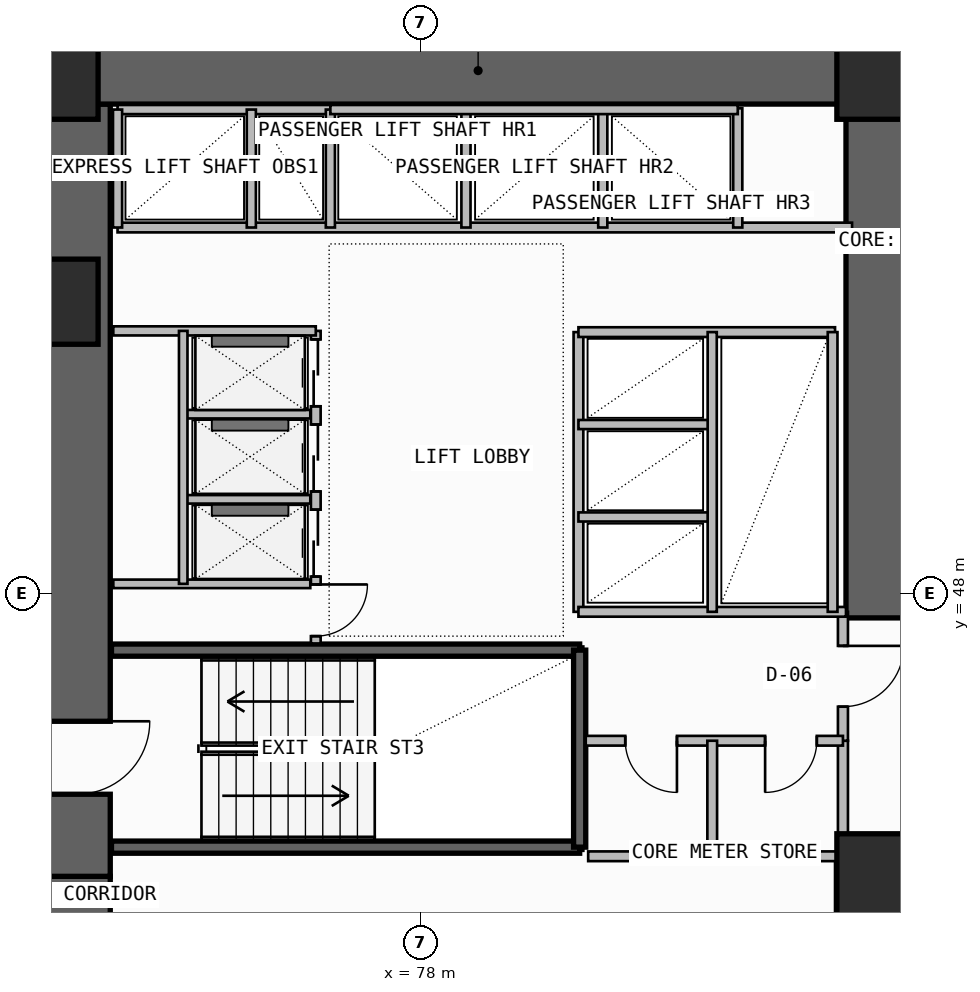
"""IFC4 building model, lengths in metres.
Left out: names, types, materials, properties, quantities, classifications, styles, units other than length and angle.
Written with IfcOpenShell. Run it as: python <this file> out.ifc"""

import sys

from ifc_helpers import new_model, si_unit, direction, frame, frame_2d, origin, origin_2d, place, context, subcontext, project, spatial, rectangle, extrude, element, fill, save


model = new_model("IFC4")
c1 = context("Model", 3, precision=1e-05, world=origin(), true_north=direction((0.0, 1.0)))
c2 = subcontext(c1, "Body", "Model", "MODEL_VIEW")
j1 = project(units=[si_unit("LENGTHUNIT", "METRE"), si_unit("PLANEANGLEUNIT", "RADIAN")], contexts=[c1])
p1 = place(None, origin())
s1 = spatial("IfcSite", under=j1, at=p1, CompositionType="ELEMENT")
p2 = place(p1, origin())
s2 = spatial("IfcBuilding", under=s1, at=p2, CompositionType="ELEMENT")
p3 = place(p2, frame((0.0, 0.0, 55.5)))
s3 = spatial("IfcBuildingStorey", under=s2, at=p3, CompositionType="ELEMENT", Elevation=55.5)
p4 = place(p3, frame((72.35, 35.5, -0.2), z_axis=(0.0, 0.0, 1.0), x_axis=(0.0, 1.0, 0.0)))
e1 = element("IfcWall", 1, at=p4, inside=s3, PredefinedType="SHEAR", context=c2, shape_type="SweptSolid", body=[
    extrude(rectangle(XDim=7.85, YDim=1.1, at=frame_2d((3.925, 0.0))), origin(), (0.0, 0.0, 1.0), 3.3),
])
p5 = place(p4, frame((1.45, 0.0, 0.2)))
e2 = element("IfcOpeningElement", 2, at=p5, cuts=e1, PredefinedType="OPENING", context=c2, shape_type="SweptSolid", body=[
    extrude(rectangle(XDim=1.2, YDim=2.2, at=frame_2d((0.6, 1.1))), frame((0.0, 0.56, 0.0), z_axis=(0.0, -1.0, 0.0), x_axis=(1.0, 0.0, 0.0)), (0.0, 0.0, 1.0), 1.12),
])
p6 = place(p3, frame((72.35, 43.35, -0.2), z_axis=(0.0, 0.0, 1.0), x_axis=(0.0, 1.0, 0.0)))
e3 = element("IfcWall", 3, at=p6, inside=s3, PredefinedType="SHEAR", context=c2, shape_type="SweptSolid", body=[
    extrude(rectangle(XDim=12.7, YDim=1.1, at=frame_2d((6.35, 0.0))), origin(), (0.0, 0.0, 1.0), 3.3),
])
p7 = place(p6, frame((1.35, 0.0, 0.2)))
e4 = element("IfcOpeningElement", 4, at=p7, cuts=e3, PredefinedType="OPENING", context=c2, shape_type="SweptSolid", body=[
    extrude(rectangle(XDim=1.2, YDim=2.2, at=frame_2d((0.6, 1.1))), frame((0.0, 0.56, 0.0), z_axis=(0.0, -1.0, 0.0), x_axis=(1.0, 0.0, 0.0)), (0.0, 0.0, 1.0), 1.12),
])
p8 = place(p3, frame((71.8, 56.6, -0.2), z_axis=(0.0, 0.0, 1.0), x_axis=(1.0, 0.0, 0.0)))
e5 = element("IfcWall", 5, at=p8, inside=s3, PredefinedType="SHEAR", context=c2, shape_type="SweptSolid", body=[
    extrude(rectangle(XDim=14.3, YDim=1.1, at=frame_2d((7.15, 0.0))), origin(), (0.0, 0.0, 1.0), 3.3),
])
p9 = place(p3, frame((85.55, 47.6, -0.2), z_axis=(0.0, 0.0, 1.0), x_axis=(0.0, 1.0, 0.0)))
e6 = element("IfcWall", 6, at=p9, inside=s3, PredefinedType="SHEAR", context=c2, shape_type="SweptSolid", body=[
    extrude(rectangle(XDim=8.45, YDim=1.1, at=frame_2d((4.225, 0.0))), origin(), (0.0, 0.0, 1.0), 3.3),
])
for number, where, z_axis, x_axis in (
    (7, (85.55, 43.35, 0.0), (0.0, 0.0, 1.0), (1.0, 0.0, 0.0)),
    (8, (72.0, 52.8, 0.0), (0.0, 0.0, 1.0), (1.0, 0.0, 0.0)),
    (9, (72.0, 56.5, 0.0), (0.0, 0.0, 1.0), (1.0, 0.0, 0.0)),
    (10, (85.55, 56.5, 0.0), (0.0, 0.0, 1.0), (1.0, 0.0, 0.0)),
):
    element("IfcColumn", number, at=place(p3, frame(where, z_axis=z_axis, x_axis=x_axis)), inside=s3, PredefinedType="COLUMN", context=c2, shape_type="SweptSolid", body=[
        extrude(rectangle(XDim=1.4, YDim=1.4, at=origin_2d()), origin(), (0.0, 0.0, 1.0), 3.6),
    ])
p10 = place(p3, frame((84.92, 38.85, 0.0), z_axis=(0.0, 0.0, 1.0), x_axis=(0.0, 1.0, 0.0)))
e11 = element("IfcWall", 11, at=p10, inside=s3, PredefinedType="SOLIDWALL", context=c2, shape_type="SweptSolid", body=[
    extrude(rectangle(XDim=4.83, YDim=0.2, at=frame_2d((2.415, 0.0))), origin(), (0.0, 0.0, 1.0), 3.1),
])
p11 = place(p10, frame((1.25, 0.0, 0.0)))
e12 = element("IfcOpeningElement", 12, at=p11, cuts=e11, PredefinedType="OPENING", context=c2, shape_type="SweptSolid", body=[
    extrude(rectangle(XDim=1.1, YDim=2.2, at=frame_2d((0.55, 1.1))), frame((0.0, 0.11, 0.0), z_axis=(0.0, -1.0, 0.0), x_axis=(1.0, 0.0, 0.0)), (0.0, 0.0, 1.0), 0.22),
])
for number, where, z_axis, x_axis in (
    (13, (72.92, 43.83, -0.2), (0.0, 0.0, 1.0), (1.0, 0.0, 0.0)),
    (14, (72.92, 47.07, -0.2), (0.0, 0.0, 1.0), (1.0, 0.0, 0.0)),
):
    element("IfcWall", number, at=place(p3, frame(where, z_axis=z_axis, x_axis=x_axis)), inside=s3, PredefinedType="SOLIDWALL", context=c2, shape_type="SweptSolid", body=[
        extrude(rectangle(XDim=7.7, YDim=0.2, at=frame_2d((3.85, 0.0))), origin(), (0.0, 0.0, 1.0), 3.3),
    ])
p12 = place(p3, frame((80.62, 43.83, -0.2), z_axis=(0.0, 0.0, 1.0), x_axis=(0.0, 1.0, 0.0)))
e15 = element("IfcWall", 15, at=p12, inside=s3, PredefinedType="SOLIDWALL", context=c2, shape_type="SweptSolid", body=[
    extrude(rectangle(XDim=3.24, YDim=0.2, at=frame_2d((1.62, 0.0))), origin(), (0.0, 0.0, 1.0), 3.3),
])
p13 = place(p3, frame((84.95, 43.68, 0.0), z_axis=(0.0, 0.0, 1.0), x_axis=(0.0, 1.0, 0.0)))
e16 = element("IfcWall", 16, at=p13, inside=s3, PredefinedType="PLUMBINGWALL", context=c2, shape_type="SweptSolid", body=[
    extrude(rectangle(XDim=1.9, YDim=0.165, at=frame_2d((0.95, 0.0))), origin(), (0.0, 0.0, 1.0), 3.1),
])
p14 = place(p3, frame((84.95, 45.58, 0.0), z_axis=(0.0, 0.0, 1.0), x_axis=(0.0, 1.0, 0.0)))
e17 = element("IfcWall", 17, at=p14, inside=s3, PredefinedType="PARTITIONING", context=c2, shape_type="SweptSolid", body=[
    extrude(rectangle(XDim=2.12, YDim=0.165, at=frame_2d((1.06, 0.0))), origin(), (0.0, 0.0, 1.0), 3.1),
])
p15 = place(p14, frame((0.56, 0.0, 0.0)))
e18 = element("IfcOpeningElement", 18, at=p15, cuts=e17, PredefinedType="OPENING", context=c2, shape_type="SweptSolid", body=[
    extrude(rectangle(XDim=1.0, YDim=2.2, at=frame_2d((0.5, 1.1))), frame((0.0, 0.093, 0.0), z_axis=(0.0, -1.0, 0.0), x_axis=(1.0, 0.0, 0.0)), (0.0, 0.0, 1.0), 0.185),
])
p16 = place(p3, frame((80.72, 45.58, 0.0), z_axis=(0.0, 0.0, 1.0), x_axis=(1.0, 0.0, 0.0)))
e19 = element("IfcWall", 19, at=p16, inside=s3, PredefinedType="PLUMBINGWALL", context=c2, shape_type="SweptSolid", body=[
    extrude(rectangle(XDim=4.23, YDim=0.16, at=frame_2d((2.115, 0.0))), origin(), (0.0, 0.0, 1.0), 3.1),
])
p17 = place(p16, frame((0.65, 0.0, 0.0)))
e20 = element("IfcOpeningElement", 20, at=p17, cuts=e19, PredefinedType="OPENING", context=c2, shape_type="SweptSolid", body=[
    extrude(rectangle(XDim=0.85, YDim=2.05, at=frame_2d((0.425, 1.025))), frame((0.0, 0.09, 0.0), z_axis=(0.0, -1.0, 0.0), x_axis=(1.0, 0.0, 0.0)), (0.0, 0.0, 1.0), 0.18),
])
p18 = place(p16, frame((2.95, 0.0, 0.0)))
e21 = element("IfcOpeningElement", 21, at=p18, cuts=e19, PredefinedType="OPENING", context=c2, shape_type="SweptSolid", body=[
    extrude(rectangle(XDim=0.85, YDim=2.05, at=frame_2d((0.425, 1.025))), frame((0.0, 0.09, 0.0), z_axis=(0.0, -1.0, 0.0), x_axis=(1.0, 0.0, 0.0)), (0.0, 0.0, 1.0), 0.18),
])
p19 = place(p3, frame((80.76, 43.68, 0.0), z_axis=(0.0, 0.0, 1.0), x_axis=(1.0, 0.0, 0.0)))
e22 = element("IfcWall", 22, at=p19, inside=s3, PredefinedType="PLUMBINGWALL", context=c2, shape_type="SweptSolid", body=[
    extrude(rectangle(XDim=4.19, YDim=0.16, at=frame_2d((2.095, 0.0))), origin(), (0.0, 0.0, 1.0), 3.1),
])
p20 = place(p3, frame((82.8, 43.68, 0.0), z_axis=(0.0, 0.0, 1.0), x_axis=(0.0, 1.0, 0.0)))
e23 = element("IfcWall", 23, at=p20, inside=s3, PredefinedType="PLUMBINGWALL", context=c2, shape_type="SweptSolid", body=[
    extrude(rectangle(XDim=1.9, YDim=0.16, at=frame_2d((0.95, 0.0))), origin(), (0.0, 0.0, 1.0), 3.1),
])
p21 = place(p3, frame((76.28, 47.18, 0.0), z_axis=(0.0, 0.0, 1.0), x_axis=(0.0, 1.0, 0.0)))
e24 = element("IfcWall", 24, at=p21, inside=s3, PredefinedType="SOLIDWALL", context=c2, shape_type="SweptSolid", body=[
    extrude(rectangle(XDim=5.14, YDim=0.16, at=frame_2d((2.57, 0.0))), origin(), (0.0, 0.0, 1.0), 3.1),
])
p22 = place(p21, frame((1.1, 0.0, 0.0)))
e25 = element("IfcOpeningElement", 25, at=p22, cuts=e24, PredefinedType="OPENING", context=c2, shape_type="SweptSolid", body=[
    extrude(rectangle(XDim=1.1, YDim=2.25, at=frame_2d((0.55, 1.125))), frame((0.0, 0.09, 0.0), z_axis=(0.0, -1.0, 0.0), x_axis=(1.0, 0.0, 0.0)), (0.0, 0.0, 1.0), 0.18),
])
p23 = place(p21, frame((2.5, 0.0, 0.0)))
e26 = element("IfcOpeningElement", 26, at=p23, cuts=e24, PredefinedType="OPENING", context=c2, shape_type="SweptSolid", body=[
    extrude(rectangle(XDim=1.1, YDim=2.25, at=frame_2d((0.55, 1.125))), frame((0.0, 0.09, 0.0), z_axis=(0.0, -1.0, 0.0), x_axis=(1.0, 0.0, 0.0)), (0.0, 0.0, 1.0), 0.18),
])
p24 = place(p21, frame((3.9, 0.0, 0.0)))
e27 = element("IfcOpeningElement", 27, at=p24, cuts=e24, PredefinedType="OPENING", context=c2, shape_type="SweptSolid", body=[
    extrude(rectangle(XDim=1.1, YDim=2.25, at=frame_2d((0.55, 1.125))), frame((0.0, 0.09, 0.0), z_axis=(0.0, -1.0, 0.0), x_axis=(1.0, 0.0, 0.0)), (0.0, 0.0, 1.0), 0.18),
])
p25 = place(p21, frame((0.12, 0.0, 0.0)))
e28 = element("IfcOpeningElement", 28, at=p25, cuts=e24, PredefinedType="OPENING", context=c2, shape_type="SweptSolid", body=[
    extrude(rectangle(XDim=0.85, YDim=2.05, at=frame_2d((0.425, 1.025))), frame((0.0, 0.09, 0.0), z_axis=(0.0, -1.0, 0.0), x_axis=(1.0, 0.0, 0.0)), (0.0, 0.0, 1.0), 0.18),
])
p26 = place(p3, frame((72.95, 52.32, 0.0), z_axis=(0.0, 0.0, 1.0), x_axis=(1.0, 0.0, 0.0)))
e29 = element("IfcWall", 29, at=p26, inside=s3, PredefinedType="SOLIDWALL", context=c2, shape_type="SweptSolid", body=[
    extrude(rectangle(XDim=3.33, YDim=0.15, at=frame_2d((1.665, 0.0))), origin(), (0.0, 0.0, 1.0), 3.1),
])
p27 = place(p3, frame((72.95, 48.16, 0.0), z_axis=(0.0, 0.0, 1.0), x_axis=(1.0, 0.0, 0.0)))
e30 = element("IfcWall", 30, at=p27, inside=s3, PredefinedType="PLUMBINGWALL", context=c2, shape_type="SweptSolid", body=[
    extrude(rectangle(XDim=3.24, YDim=0.14, at=frame_2d((1.62, 0.0))), origin(), (0.0, 0.0, 1.0), 3.1),
])
for number, where, z_axis, x_axis in (
    (31, (74.15, 49.55, 0.0), (0.0, 0.0, 1.0), (1.0, 0.0, 0.0)),
    (32, (74.15, 50.95, 0.0), (0.0, 0.0, 1.0), (1.0, 0.0, 0.0)),
):
    element("IfcWall", number, at=place(p3, frame(where, z_axis=z_axis, x_axis=x_axis)), inside=s3, PredefinedType="PLUMBINGWALL", context=c2, shape_type="SweptSolid", body=[
        extrude(rectangle(XDim=2.04, YDim=0.14, at=frame_2d((1.02, 0.0))), origin(), (0.0, 0.0, 1.0), 3.1),
    ])
p28 = place(p3, frame((74.1, 48.16, 0.0), z_axis=(0.0, 0.0, 1.0), x_axis=(0.0, 1.0, 0.0)))
e33 = element("IfcWall", 33, at=p28, inside=s3, PredefinedType="PLUMBINGWALL", context=c2, shape_type="SweptSolid", body=[
    extrude(rectangle(XDim=4.16, YDim=0.14, at=frame_2d((2.08, 0.0))), origin(), (0.0, 0.0, 1.0), 3.1),
])
p29 = place(p3, frame((80.6, 47.7, 0.0), z_axis=(0.0, 0.0, 1.0), x_axis=(0.0, 1.0, 0.0)))
e34 = element("IfcWall", 34, at=p29, inside=s3, PredefinedType="SOLIDWALL", context=c2, shape_type="SweptSolid", body=[
    extrude(rectangle(XDim=4.6, YDim=0.16, at=frame_2d((2.3, 0.0))), origin(), (0.0, 0.0, 1.0), 3.1),
])
p30 = place(p3, frame((80.6, 47.7, 0.0), z_axis=(0.0, 0.0, 1.0), x_axis=(1.0, 0.0, 0.0)))
e35 = element("IfcWall", 35, at=p30, inside=s3, PredefinedType="SOLIDWALL", context=c2, shape_type="SweptSolid", body=[
    extrude(rectangle(XDim=4.4, YDim=0.16, at=frame_2d((2.2, 0.0))), origin(), (0.0, 0.0, 1.0), 3.1),
])
p31 = place(p3, frame((80.6, 52.3, 0.0), z_axis=(0.0, 0.0, 1.0), x_axis=(1.0, 0.0, 0.0)))
e36 = element("IfcWall", 36, at=p31, inside=s3, PredefinedType="SOLIDWALL", context=c2, shape_type="SweptSolid", body=[
    extrude(rectangle(XDim=4.22, YDim=0.16, at=frame_2d((2.11, 0.0))), origin(), (0.0, 0.0, 1.0), 3.1),
])
for number, where, z_axis, x_axis in (
    (37, (80.6, 49.26, 0.0), (0.0, 0.0, 1.0), (1.0, 0.0, 0.0)),
    (38, (80.6, 50.78, 0.0), (0.0, 0.0, 1.0), (1.0, 0.0, 0.0)),
):
    element("IfcWall", number, at=place(p3, frame(where, z_axis=z_axis, x_axis=x_axis)), inside=s3, PredefinedType="PLUMBINGWALL", context=c2, shape_type="SweptSolid", body=[
        extrude(rectangle(XDim=2.2, YDim=0.15, at=frame_2d((1.1, 0.0))), origin(), (0.0, 0.0, 1.0), 3.1),
    ])
p32 = place(p3, frame((82.8, 47.7, 0.0), z_axis=(0.0, 0.0, 1.0), x_axis=(0.0, 1.0, 0.0)))
e39 = element("IfcWall", 39, at=p32, inside=s3, PredefinedType="PLUMBINGWALL", context=c2, shape_type="SweptSolid", body=[
    extrude(rectangle(XDim=4.6, YDim=0.15, at=frame_2d((2.3, 0.0))), origin(), (0.0, 0.0, 1.0), 3.1),
])
p33 = place(p3, frame((84.78, 47.7, 0.0), z_axis=(0.0, 0.0, 1.0), x_axis=(0.0, 1.0, 0.0)))
e40 = element("IfcWall", 40, at=p33, inside=s3, PredefinedType="SOLIDWALL", context=c2, shape_type="SweptSolid", body=[
    extrude(rectangle(XDim=4.6, YDim=0.16, at=frame_2d((2.3, 0.0))), origin(), (0.0, 0.0, 1.0), 3.1),
])
p34 = place(p3, frame((73.02, 54.02, 0.0), z_axis=(0.0, 0.0, 1.0), x_axis=(1.0, 0.0, 0.0)))
e41 = element("IfcWall", 41, at=p34, inside=s3, PredefinedType="SOLIDWALL", context=c2, shape_type="SweptSolid", body=[
    extrude(rectangle(XDim=12.08, YDim=0.16, at=frame_2d((6.04, 0.0))), origin(), (0.0, 0.0, 1.0), 3.1),
])
p35 = place(p3, frame((73.02, 55.96, 0.0), z_axis=(0.0, 0.0, 1.0), x_axis=(1.0, 0.0, 0.0)))
e42 = element("IfcWall", 42, at=p35, inside=s3, PredefinedType="SOLIDWALL", context=c2, shape_type="SweptSolid", body=[
    extrude(rectangle(XDim=3.5, YDim=0.15, at=frame_2d((1.75, 0.0))), origin(), (0.0, 0.0, 1.0), 3.1),
])
p36 = place(p3, frame((73.02, 54.02, 0.0), z_axis=(0.0, 0.0, 1.0), x_axis=(0.0, 1.0, 0.0)))
e43 = element("IfcWall", 43, at=p36, inside=s3, PredefinedType="PLUMBINGWALL", context=c2, shape_type="SweptSolid", body=[
    extrude(rectangle(XDim=1.94, YDim=0.15, at=frame_2d((0.97, 0.0))), origin(), (0.0, 0.0, 1.0), 3.1),
])
p37 = place(p3, frame((76.52, 54.02, 0.0), z_axis=(0.0, 0.0, 1.0), x_axis=(0.0, 1.0, 0.0)))
e44 = element("IfcWall", 44, at=p37, inside=s3, PredefinedType="SOLIDWALL", context=c2, shape_type="SweptSolid", body=[
    extrude(rectangle(XDim=1.94, YDim=0.15, at=frame_2d((0.97, 0.0))), origin(), (0.0, 0.0, 1.0), 3.1),
])
p38 = place(p3, frame((75.22, 54.02, 0.0), z_axis=(0.0, 0.0, 1.0), x_axis=(0.0, 1.0, 0.0)))
e45 = element("IfcWall", 45, at=p38, inside=s3, PredefinedType="PLUMBINGWALL", context=c2, shape_type="SweptSolid", body=[
    extrude(rectangle(XDim=1.94, YDim=0.15, at=frame_2d((0.97, 0.0))), origin(), (0.0, 0.0, 1.0), 3.1),
])
for number, where, z_axis, x_axis in (
    (46, (78.75, 54.02, 0.0), (0.0, 0.0, 1.0), (0.0, 1.0, 0.0)),
    (47, (81.0, 54.02, 0.0), (0.0, 0.0, 1.0), (0.0, 1.0, 0.0)),
):
    element("IfcWall", number, at=place(p3, frame(where, z_axis=z_axis, x_axis=x_axis)), inside=s3, PredefinedType="PLUMBINGWALL", context=c2, shape_type="SweptSolid", body=[
        extrude(rectangle(XDim=1.96, YDim=0.15, at=frame_2d((0.98, 0.0))), origin(), (0.0, 0.0, 1.0), 3.1),
    ])
p39 = place(p3, frame((83.22, 54.02, 0.0), z_axis=(0.0, 0.0, 1.0), x_axis=(0.0, 1.0, 0.0)))
e48 = element("IfcWall", 48, at=p39, inside=s3, PredefinedType="SOLIDWALL", context=c2, shape_type="SweptSolid", body=[
    extrude(rectangle(XDim=1.96, YDim=0.15, at=frame_2d((0.98, 0.0))), origin(), (0.0, 0.0, 1.0), 3.1),
])
p40 = place(p3, frame((76.52, 55.96, 0.0), z_axis=(0.0, 0.0, 1.0), x_axis=(1.0, 0.0, 0.0)))
e49 = element("IfcWall", 49, at=p40, inside=s3, PredefinedType="SOLIDWALL", context=c2, shape_type="SweptSolid", body=[
    extrude(rectangle(XDim=6.7, YDim=0.15, at=frame_2d((3.35, 0.0))), origin(), (0.0, 0.0, 1.0), 3.1),
])
p41 = place(p7, frame((1.2, 0.0, 0.0), z_axis=(0.0, 0.0, 1.0), x_axis=(-1.0, 0.0, 0.0)))
e50 = element("IfcDoor", 50, at=p41, inside=s3, OperationType="SINGLE_SWING_LEFT", PredefinedType="USERDEFINED", context=c2, shape_type="SweptSolid", body=[
    extrude(rectangle(XDim=1.2, YDim=2.2, at=frame_2d((0.6, 1.1))), frame((0.0, 0.025, 0.0), z_axis=(0.0, -1.0, 0.0), x_axis=(1.0, 0.0, 0.0)), (0.0, 0.0, 1.0), 0.05),
])
fill(e4, e50)
p42 = place(p15, frame((1.0, 0.0, 0.0), z_axis=(0.0, 0.0, 1.0), x_axis=(-1.0, 0.0, 0.0)))
e51 = element("IfcDoor", 51, at=p42, inside=s3, OperationType="SINGLE_SWING_LEFT", PredefinedType="DOOR", context=c2, shape_type="SweptSolid", body=[
    extrude(rectangle(XDim=1.0, YDim=2.2, at=frame_2d((0.5, 1.1))), frame((0.0, 0.025, 0.0), z_axis=(0.0, -1.0, 0.0), x_axis=(1.0, 0.0, 0.0)), (0.0, 0.0, 1.0), 0.05),
])
fill(e18, e51)
p43 = place(p17, frame((0.85, 0.0, 0.0), z_axis=(0.0, 0.0, 1.0), x_axis=(-1.0, 0.0, 0.0)))
e52 = element("IfcDoor", 52, at=p43, inside=s3, OperationType="SINGLE_SWING_LEFT", PredefinedType="DOOR", context=c2, shape_type="SweptSolid", body=[
    extrude(rectangle(XDim=0.85, YDim=2.05, at=frame_2d((0.425, 1.025))), frame((0.0, 0.025, 0.0), z_axis=(0.0, -1.0, 0.0), x_axis=(1.0, 0.0, 0.0)), (0.0, 0.0, 1.0), 0.05),
])
fill(e20, e52)
p44 = place(p18, frame((0.85, 0.0, 0.0), z_axis=(0.0, 0.0, 1.0), x_axis=(-1.0, 0.0, 0.0)))
e53 = element("IfcDoor", 53, at=p44, inside=s3, OperationType="SINGLE_SWING_RIGHT", PredefinedType="DOOR", context=c2, shape_type="SweptSolid", body=[
    extrude(rectangle(XDim=0.85, YDim=2.05, at=frame_2d((0.425, 1.025))), frame((0.0, 0.025, 0.0), z_axis=(0.0, -1.0, 0.0), x_axis=(1.0, 0.0, 0.0)), (0.0, 0.0, 1.0), 0.05),
])
fill(e21, e53)
p45 = place(p22, origin())
e54 = element("IfcDoor", 54, at=p45, inside=s3, OperationType="DOUBLE_DOOR_SLIDING", PredefinedType="DOOR", context=c2, shape_type="SweptSolid", body=[
    extrude(rectangle(XDim=1.1, YDim=2.25, at=frame_2d((0.55, 1.125))), frame((0.0, 0.025, 0.0), z_axis=(0.0, -1.0, 0.0), x_axis=(1.0, 0.0, 0.0)), (0.0, 0.0, 1.0), 0.05),
])
fill(e25, e54)
p46 = place(p23, origin())
e55 = element("IfcDoor", 55, at=p46, inside=s3, OperationType="DOUBLE_DOOR_SLIDING", PredefinedType="DOOR", context=c2, shape_type="SweptSolid", body=[
    extrude(rectangle(XDim=1.1, YDim=2.25, at=frame_2d((0.55, 1.125))), frame((0.0, 0.025, 0.0), z_axis=(0.0, -1.0, 0.0), x_axis=(1.0, 0.0, 0.0)), (0.0, 0.0, 1.0), 0.05),
])
fill(e26, e55)
p47 = place(p24, origin())
e56 = element("IfcDoor", 56, at=p47, inside=s3, OperationType="DOUBLE_DOOR_SLIDING", PredefinedType="DOOR", context=c2, shape_type="SweptSolid", body=[
    extrude(rectangle(XDim=1.1, YDim=2.25, at=frame_2d((0.55, 1.125))), frame((0.0, 0.025, 0.0), z_axis=(0.0, -1.0, 0.0), x_axis=(1.0, 0.0, 0.0)), (0.0, 0.0, 1.0), 0.05),
])
fill(e27, e56)
p48 = place(p25, frame((0.85, 0.0, 0.0), z_axis=(0.0, 0.0, 1.0), x_axis=(-1.0, 0.0, 0.0)))
e57 = element("IfcDoor", 57, at=p48, inside=s3, OperationType="SINGLE_SWING_LEFT", PredefinedType="DOOR", context=c2, shape_type="SweptSolid", body=[
    extrude(rectangle(XDim=0.85, YDim=2.05, at=frame_2d((0.425, 1.025))), frame((0.0, 0.025, 0.0), z_axis=(0.0, -1.0, 0.0), x_axis=(1.0, 0.0, 0.0)), (0.0, 0.0, 1.0), 0.05),
])
fill(e28, e57)
save(model, sys.argv[1])
